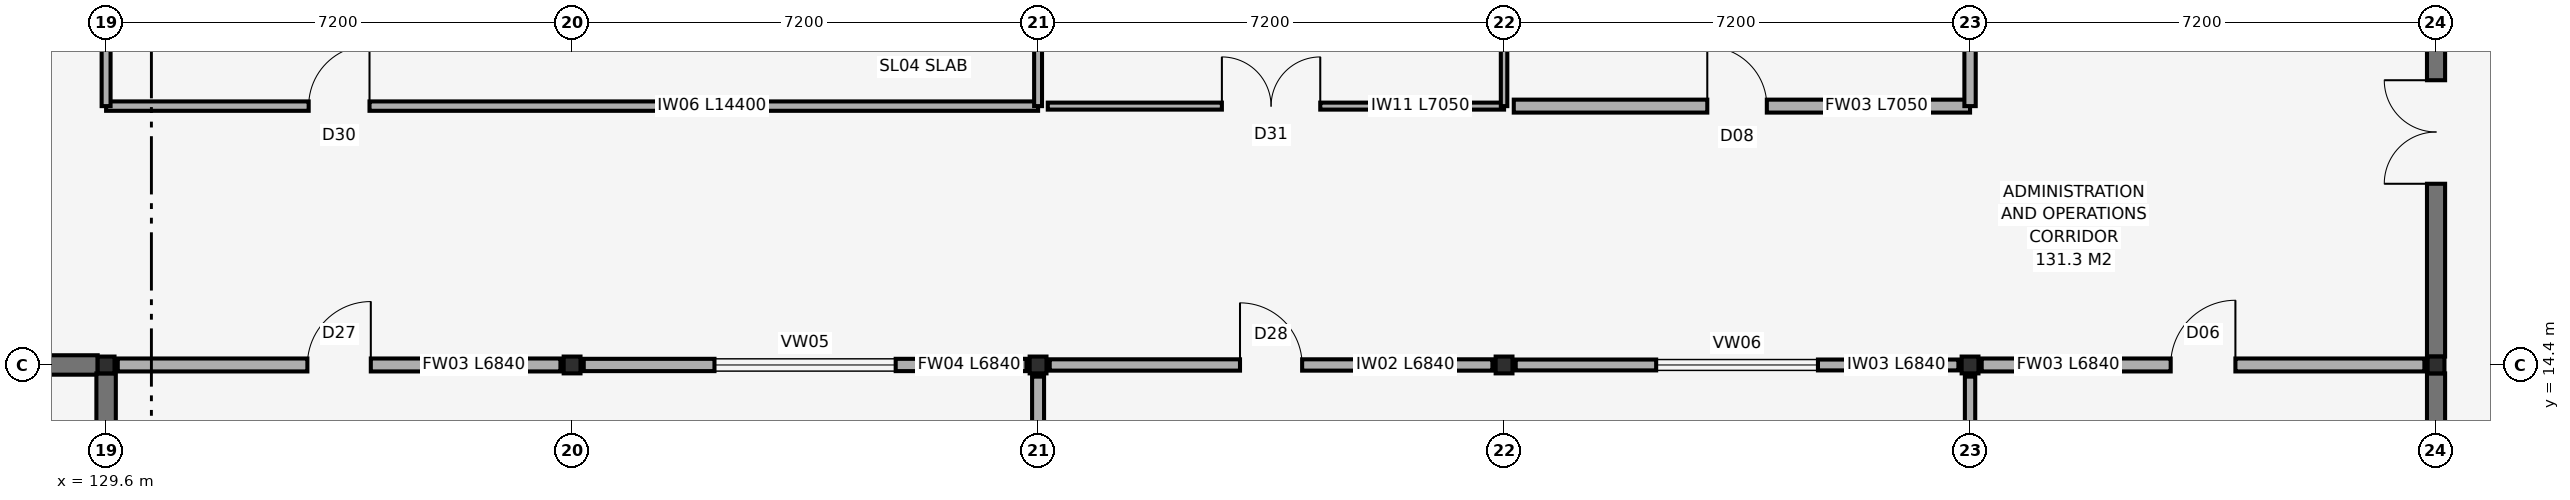
"""IFC4 building model, lengths in metres.
Left out: names, types, materials, properties, quantities, classifications, styles, units other than length and angle.
Written with IfcOpenShell. Run it as: python <this file> out.ifc"""

import sys

from ifc_helpers import new_model, si_unit, direction, frame, frame_2d, origin, origin_2d, place, context, subcontext, project, spatial, rectangle, hollow_rectangle, extrude, element, fill, save


model = new_model("IFC4")
c1 = context("Model", 3, precision=1e-05, world=origin(), true_north=direction((0.0, 1.0)))
c2 = subcontext(c1, "Body", "Model", "MODEL_VIEW")
j1 = project(units=[si_unit("LENGTHUNIT", "METRE"), si_unit("PLANEANGLEUNIT", "RADIAN")], contexts=[c1])
p1 = place(None, origin())
s1 = spatial("IfcSite", under=j1, at=p1, CompositionType="ELEMENT")
p2 = place(p1, origin())
s2 = spatial("IfcBuilding", under=s1, at=p2, CompositionType="ELEMENT")
p3 = place(p2, frame((0.0, 0.0, 23.4)))
s3 = spatial("IfcBuildingStorey", under=s2, at=p3, CompositionType="ELEMENT", Elevation=23.4)
for number, where, z_axis, x_axis in (
    (1, (129.6, 14.4, 0.0), (0.0, 0.0, 1.0), (1.0, 0.0, 0.0)),
    (2, (136.8, 14.4, 0.0), (0.0, 0.0, 1.0), (1.0, 0.0, 0.0)),
    (3, (144.0, 14.4, 0.0), (0.0, 0.0, 1.0), (1.0, 0.0, 0.0)),
    (4, (151.2, 14.4, 0.0), (0.0, 0.0, 1.0), (1.0, 0.0, 0.0)),
    (5, (158.4, 14.4, 0.0), (0.0, 0.0, 1.0), (1.0, 0.0, 0.0)),
    (6, (165.6, 14.4, 0.0), (0.0, 0.0, 1.0), (1.0, 0.0, 0.0)),
):
    element("IfcColumn", number, at=place(p3, frame(where, z_axis=z_axis, x_axis=x_axis)), inside=s3, PredefinedType="COLUMN", context=c2, shape_type="SweptSolid", body=[
        extrude(hollow_rectangle(XDim=0.26, YDim=0.26, WallThickness=0.012, at=origin_2d()), origin(), (0.0, 0.0, 1.0), 4.2),
    ])
p4 = place(p3, frame((122.53, 14.4, 0.0), z_axis=(0.0, 0.0, 1.0), x_axis=(1.0, 0.0, 0.0)))
e7 = element("IfcWall", 7, at=p4, inside=s3, PredefinedType="SHEAR", context=c2, shape_type="SweptSolid", body=[
    extrude(rectangle(XDim=6.94, YDim=0.3, at=frame_2d((3.47, 0.0))), origin(), (0.0, 0.0, 1.0), 4.0),
])
p5 = place(p3, frame((129.6, 7.33, 0.0), z_axis=(0.0, 0.0, 1.0), x_axis=(0.0, 1.0, 0.0)))
e8 = element("IfcWall", 8, at=p5, inside=s3, PredefinedType="SHEAR", context=c2, shape_type="SweptSolid", body=[
    extrude(rectangle(XDim=6.94, YDim=0.3, at=frame_2d((3.47, 0.0))), origin(), (0.0, 0.0, 1.0), 4.0),
])
p6 = place(p5, frame((2.67, 0.0, 0.0)))
e9 = element("IfcOpeningElement", 9, at=p6, cuts=e8, PredefinedType="OPENING", context=c2, shape_type="SweptSolid", body=[
    extrude(rectangle(XDim=1.6, YDim=2.2, at=frame_2d((0.8, 1.1))), frame((0.0, 0.165, 0.0), z_axis=(0.0, -1.0, 0.0), x_axis=(1.0, 0.0, 0.0)), (0.0, 0.0, 1.0), 0.33),
])
p7 = place(p3, frame((165.6, 7.33, 0.0), z_axis=(0.0, 0.0, 1.0), x_axis=(0.0, 1.0, 0.0)))
e10 = element("IfcWall", 10, at=p7, inside=s3, PredefinedType="SHEAR", context=c2, shape_type="SweptSolid", body=[
    extrude(rectangle(XDim=6.94, YDim=0.28, at=frame_2d((3.47, 0.0))), origin(), (0.0, 0.0, 1.0), 4.0),
])
p8 = place(p3, frame((165.6, 14.53, 0.0), z_axis=(0.0, 0.0, 1.0), x_axis=(0.0, 1.0, 0.0)))
e11 = element("IfcWall", 11, at=p8, inside=s3, PredefinedType="SHEAR", context=c2, shape_type="SweptSolid", body=[
    extrude(rectangle(XDim=6.94, YDim=0.28, at=frame_2d((3.47, 0.0))), origin(), (0.0, 0.0, 1.0), 4.0),
])
p9 = place(p8, frame((2.67, 0.0, 0.0)))
e12 = element("IfcOpeningElement", 12, at=p9, cuts=e11, PredefinedType="OPENING", context=c2, shape_type="SweptSolid", body=[
    extrude(rectangle(XDim=1.6, YDim=2.2, at=frame_2d((0.8, 1.1))), frame((0.0, 0.155, 0.0), z_axis=(0.0, -1.0, 0.0), x_axis=(1.0, 0.0, 0.0)), (0.0, 0.0, 1.0), 0.31),
])
p10 = place(p3, frame((129.78, 14.4, 0.0), z_axis=(0.0, 0.0, 1.0), x_axis=(1.0, 0.0, 0.0)))
e13 = element("IfcWall", 13, at=p10, inside=s3, PredefinedType="SOLIDWALL", context=c2, shape_type="SweptSolid", body=[
    extrude(rectangle(XDim=6.84, YDim=0.2, at=frame_2d((3.42, 0.0))), origin(), (0.0, 0.0, 1.0), 3.98),
])
p11 = place(p10, frame((2.93, 0.0, 0.0)))
e14 = element("IfcOpeningElement", 14, at=p11, cuts=e13, PredefinedType="OPENING", context=c2, shape_type="SweptSolid", body=[
    extrude(rectangle(XDim=0.98, YDim=2.15, at=frame_2d((0.49, 1.075))), frame((0.0, 0.115, 0.0), z_axis=(0.0, -1.0, 0.0), x_axis=(1.0, 0.0, 0.0)), (0.0, 0.0, 1.0), 0.23),
])
p12 = place(p3, frame((136.98, 14.4, 0.0), z_axis=(0.0, 0.0, 1.0), x_axis=(1.0, 0.0, 0.0)))
e15 = element("IfcWall", 15, at=p12, inside=s3, PredefinedType="SOLIDWALL", context=c2, shape_type="SweptSolid", body=[
    extrude(rectangle(XDim=6.84, YDim=0.19, at=frame_2d((3.42, 0.0))), origin(), (0.0, 0.0, 1.0), 3.98),
])
p13 = place(p12, frame((2.02, 0.0, 0.95)))
e16 = element("IfcOpeningElement", 16, at=p13, cuts=e15, PredefinedType="OPENING", context=c2, shape_type="SweptSolid", body=[
    extrude(rectangle(XDim=2.8, YDim=1.35, at=frame_2d((1.4, 0.675))), frame((0.0, 0.11, 0.0), z_axis=(0.0, -1.0, 0.0), x_axis=(1.0, 0.0, 0.0)), (0.0, 0.0, 1.0), 0.22),
])
p14 = place(p3, frame((144.0, 7.38, 0.0), z_axis=(0.0, 0.0, 1.0), x_axis=(0.0, 1.0, 0.0)))
e17 = element("IfcWall", 17, at=p14, inside=s3, PredefinedType="PARTITIONING", context=c2, shape_type="SweptSolid", body=[
    extrude(rectangle(XDim=6.84, YDim=0.185, at=frame_2d((3.42, 0.0))), origin(), (0.0, 0.0, 1.0), 3.98),
])
p15 = place(p3, frame((144.18, 14.4, 0.0), z_axis=(0.0, 0.0, 1.0), x_axis=(1.0, 0.0, 0.0)))
e18 = element("IfcWall", 18, at=p15, inside=s3, PredefinedType="PARTITIONING", context=c2, shape_type="SweptSolid", body=[
    extrude(rectangle(XDim=6.84, YDim=0.175, at=frame_2d((3.42, 0.0))), origin(), (0.0, 0.0, 1.0), 3.98),
])
p16 = place(p15, frame((2.94, 0.0, 0.0)))
e19 = element("IfcOpeningElement", 19, at=p16, cuts=e18, PredefinedType="OPENING", context=c2, shape_type="SweptSolid", body=[
    extrude(rectangle(XDim=0.96, YDim=2.15, at=frame_2d((0.48, 1.075))), frame((0.0, 0.103, 0.0), z_axis=(0.0, -1.0, 0.0), x_axis=(1.0, 0.0, 0.0)), (0.0, 0.0, 1.0), 0.205),
])
p17 = place(p3, frame((151.38, 14.4, 0.0), z_axis=(0.0, 0.0, 1.0), x_axis=(1.0, 0.0, 0.0)))
e20 = element("IfcWall", 20, at=p17, inside=s3, PredefinedType="PARTITIONING", context=c2, shape_type="SweptSolid", body=[
    extrude(rectangle(XDim=6.84, YDim=0.168, at=frame_2d((3.42, 0.0))), origin(), (0.0, 0.0, 1.0), 3.98),
])
p18 = place(p17, frame((2.17, 0.0, 0.95)))
e21 = element("IfcOpeningElement", 21, at=p18, cuts=e20, PredefinedType="OPENING", context=c2, shape_type="SweptSolid", body=[
    extrude(rectangle(XDim=2.5, YDim=1.35, at=frame_2d((1.25, 0.675))), frame((0.0, 0.099, 0.0), z_axis=(0.0, -1.0, 0.0), x_axis=(1.0, 0.0, 0.0)), (0.0, 0.0, 1.0), 0.198),
])
p19 = place(p3, frame((158.4, 7.38, 0.0), z_axis=(0.0, 0.0, 1.0), x_axis=(0.0, 1.0, 0.0)))
e22 = element("IfcWall", 22, at=p19, inside=s3, PredefinedType="PARTITIONING", context=c2, shape_type="SweptSolid", body=[
    extrude(rectangle(XDim=6.84, YDim=0.16, at=frame_2d((3.42, 0.0))), origin(), (0.0, 0.0, 1.0), 3.98),
])
p20 = place(p3, frame((158.58, 14.4, 0.0), z_axis=(0.0, 0.0, 1.0), x_axis=(1.0, 0.0, 0.0)))
e23 = element("IfcWall", 23, at=p20, inside=s3, PredefinedType="SOLIDWALL", context=c2, shape_type="SweptSolid", body=[
    extrude(rectangle(XDim=6.84, YDim=0.2, at=frame_2d((3.42, 0.0))), origin(), (0.0, 0.0, 1.0), 3.98),
])
p21 = place(p20, frame((2.92, 0.0, 0.0)))
e24 = element("IfcOpeningElement", 24, at=p21, cuts=e23, PredefinedType="OPENING", context=c2, shape_type="SweptSolid", body=[
    extrude(rectangle(XDim=1.0, YDim=2.1, at=frame_2d((0.5, 1.05))), frame((0.0, 0.115, 0.0), z_axis=(0.0, -1.0, 0.0), x_axis=(1.0, 0.0, 0.0)), (0.0, 0.0, 1.0), 0.23),
])
p22 = place(p3, frame((129.6, 18.4, 0.0), z_axis=(0.0, 0.0, 1.0), x_axis=(1.0, 0.0, 0.0)))
e25 = element("IfcWall", 25, at=p22, inside=s3, PredefinedType="PARTITIONING", context=c2, shape_type="SweptSolid", body=[
    extrude(rectangle(XDim=14.4, YDim=0.145, at=frame_2d((7.2, 0.0))), origin(), (0.0, 0.0, 1.0), 3.98),
])
p23 = place(p22, frame((3.13, 0.0, 0.0)))
e26 = element("IfcOpeningElement", 26, at=p23, cuts=e25, PredefinedType="OPENING", context=c2, shape_type="SweptSolid", body=[
    extrude(rectangle(XDim=0.94, YDim=2.15, at=frame_2d((0.47, 1.075))), frame((0.0, 0.087, 0.0), z_axis=(0.0, -1.0, 0.0), x_axis=(1.0, 0.0, 0.0)), (0.0, 0.0, 1.0), 0.175),
])
p24 = place(p3, frame((129.6, 18.4, 0.0), z_axis=(0.0, 0.0, 1.0), x_axis=(0.0, 1.0, 0.0)))
e27 = element("IfcWall", 27, at=p24, inside=s3, PredefinedType="PARTITIONING", context=c2, shape_type="SweptSolid", body=[
    extrude(rectangle(XDim=3.02, YDim=0.138, at=frame_2d((1.51, 0.0))), origin(), (0.0, 0.0, 1.0), 3.98),
])
p25 = place(p3, frame((144.0, 18.4, 0.0), z_axis=(0.0, 0.0, 1.0), x_axis=(0.0, 1.0, 0.0)))
e28 = element("IfcWall", 28, at=p25, inside=s3, PredefinedType="PARTITIONING", context=c2, shape_type="SweptSolid", body=[
    extrude(rectangle(XDim=3.02, YDim=0.122, at=frame_2d((1.51, 0.0))), origin(), (0.0, 0.0, 1.0), 3.98),
])
p26 = place(p3, frame((144.15, 18.4, 0.0), z_axis=(0.0, 0.0, 1.0), x_axis=(1.0, 0.0, 0.0)))
e29 = element("IfcWall", 29, at=p26, inside=s3, PredefinedType="PARTITIONING", context=c2, shape_type="SweptSolid", body=[
    extrude(rectangle(XDim=7.05, YDim=0.108, at=frame_2d((3.525, 0.0))), origin(), (0.0, 0.0, 1.0), 3.98),
])
p27 = place(p26, frame((2.69, 0.0, 0.0)))
e30 = element("IfcOpeningElement", 30, at=p27, cuts=e29, PredefinedType="OPENING", context=c2, shape_type="SweptSolid", body=[
    extrude(rectangle(XDim=1.52, YDim=2.2, at=frame_2d((0.76, 1.1))), frame((0.0, 0.069, 0.0), z_axis=(0.0, -1.0, 0.0), x_axis=(1.0, 0.0, 0.0)), (0.0, 0.0, 1.0), 0.138),
])
p28 = place(p3, frame((151.2, 18.4, 0.0), z_axis=(0.0, 0.0, 1.0), x_axis=(0.0, 1.0, 0.0)))
e31 = element("IfcWall", 31, at=p28, inside=s3, PredefinedType="PARTITIONING", context=c2, shape_type="SweptSolid", body=[
    extrude(rectangle(XDim=3.02, YDim=0.1, at=frame_2d((1.51, 0.0))), origin(), (0.0, 0.0, 1.0), 3.98),
])
p29 = place(p3, frame((151.35, 18.4, 0.0), z_axis=(0.0, 0.0, 1.0), x_axis=(1.0, 0.0, 0.0)))
e32 = element("IfcWall", 32, at=p29, inside=s3, PredefinedType="SOLIDWALL", context=c2, shape_type="SweptSolid", body=[
    extrude(rectangle(XDim=7.05, YDim=0.2, at=frame_2d((3.525, 0.0))), origin(), (0.0, 0.0, 1.0), 3.98),
])
p30 = place(p29, frame((2.99, 0.0, 0.0)))
e33 = element("IfcOpeningElement", 33, at=p30, cuts=e32, PredefinedType="OPENING", context=c2, shape_type="SweptSolid", body=[
    extrude(rectangle(XDim=0.92, YDim=2.1, at=frame_2d((0.46, 1.05))), frame((0.0, 0.115, 0.0), z_axis=(0.0, -1.0, 0.0), x_axis=(1.0, 0.0, 0.0)), (0.0, 0.0, 1.0), 0.23),
])
p31 = place(p3, frame((158.4, 18.4, 0.0), z_axis=(0.0, 0.0, 1.0), x_axis=(0.0, 1.0, 0.0)))
e34 = element("IfcWall", 34, at=p31, inside=s3, PredefinedType="PARTITIONING", context=c2, shape_type="SweptSolid", body=[
    extrude(rectangle(XDim=3.02, YDim=0.175, at=frame_2d((1.51, 0.0))), origin(), (0.0, 0.0, 1.0), 3.98),
])
p32 = place(p9, origin())
e35 = element("IfcDoor", 35, at=p32, inside=s3, OperationType="DOUBLE_SWING_LEFT", PredefinedType="DOOR", context=c2, shape_type="SweptSolid", body=[
    extrude(rectangle(XDim=1.6, YDim=2.2, at=frame_2d((0.8, 1.1))), frame((0.0, 0.025, 0.0), z_axis=(0.0, -1.0, 0.0), x_axis=(1.0, 0.0, 0.0)), (0.0, 0.0, 1.0), 0.05),
])
fill(e12, e35)
p33 = place(p11, frame((0.98, 0.0, 0.0), z_axis=(0.0, 0.0, 1.0), x_axis=(-1.0, 0.0, 0.0)))
e36 = element("IfcDoor", 36, at=p33, inside=s3, OperationType="SINGLE_SWING_LEFT", PredefinedType="DOOR", context=c2, shape_type="SweptSolid", body=[
    extrude(rectangle(XDim=0.98, YDim=2.15, at=frame_2d((0.49, 1.075))), frame((0.0, 0.025, 0.0), z_axis=(0.0, -1.0, 0.0), x_axis=(1.0, 0.0, 0.0)), (0.0, 0.0, 1.0), 0.05),
])
fill(e14, e36)
p34 = place(p13, origin())
e37 = element("IfcWindow", 37, at=p34, inside=s3, PartitioningType="SINGLE_PANEL", PredefinedType="WINDOW", context=c2, shape_type="SweptSolid", body=[
    extrude(rectangle(XDim=2.8, YDim=1.35, at=frame_2d((1.4, 0.675))), frame((0.0, 0.03, 0.0), z_axis=(0.0, -1.0, 0.0), x_axis=(1.0, 0.0, 0.0)), (0.0, 0.0, 1.0), 0.06),
])
fill(e16, e37)
p35 = place(p16, frame((0.96, 0.0, 0.0), z_axis=(0.0, 0.0, 1.0), x_axis=(-1.0, 0.0, 0.0)))
e38 = element("IfcDoor", 38, at=p35, inside=s3, OperationType="SINGLE_SWING_RIGHT", PredefinedType="DOOR", context=c2, shape_type="SweptSolid", body=[
    extrude(rectangle(XDim=0.96, YDim=2.15, at=frame_2d((0.48, 1.075))), frame((0.0, 0.025, 0.0), z_axis=(0.0, -1.0, 0.0), x_axis=(1.0, 0.0, 0.0)), (0.0, 0.0, 1.0), 0.05),
])
fill(e19, e38)
p36 = place(p18, origin())
e39 = element("IfcWindow", 39, at=p36, inside=s3, PartitioningType="SINGLE_PANEL", PredefinedType="WINDOW", context=c2, shape_type="SweptSolid", body=[
    extrude(rectangle(XDim=2.5, YDim=1.35, at=frame_2d((1.25, 0.675))), frame((0.0, 0.03, 0.0), z_axis=(0.0, -1.0, 0.0), x_axis=(1.0, 0.0, 0.0)), (0.0, 0.0, 1.0), 0.06),
])
fill(e21, e39)
p37 = place(p21, frame((1.0, 0.0, 0.0), z_axis=(0.0, 0.0, 1.0), x_axis=(-1.0, 0.0, 0.0)))
e40 = element("IfcDoor", 40, at=p37, inside=s3, OperationType="SINGLE_SWING_LEFT", PredefinedType="DOOR", context=c2, shape_type="SweptSolid", body=[
    extrude(rectangle(XDim=1.0, YDim=2.1, at=frame_2d((0.5, 1.05))), frame((0.0, 0.025, 0.0), z_axis=(0.0, -1.0, 0.0), x_axis=(1.0, 0.0, 0.0)), (0.0, 0.0, 1.0), 0.05),
])
fill(e24, e40)
p38 = place(p23, origin())
e41 = element("IfcDoor", 41, at=p38, inside=s3, OperationType="SINGLE_SWING_RIGHT", PredefinedType="DOOR", context=c2, shape_type="SweptSolid", body=[
    extrude(rectangle(XDim=0.94, YDim=2.15, at=frame_2d((0.47, 1.075))), frame((0.0, 0.025, 0.0), z_axis=(0.0, -1.0, 0.0), x_axis=(1.0, 0.0, 0.0)), (0.0, 0.0, 1.0), 0.05),
])
fill(e26, e41)
p39 = place(p27, origin())
e42 = element("IfcDoor", 42, at=p39, inside=s3, OperationType="DOUBLE_SWING_LEFT", PredefinedType="DOOR", context=c2, shape_type="SweptSolid", body=[
    extrude(rectangle(XDim=1.52, YDim=2.2, at=frame_2d((0.76, 1.1))), frame((0.0, 0.025, 0.0), z_axis=(0.0, -1.0, 0.0), x_axis=(1.0, 0.0, 0.0)), (0.0, 0.0, 1.0), 0.05),
])
fill(e30, e42)
p40 = place(p30, origin())
e43 = element("IfcDoor", 43, at=p40, inside=s3, OperationType="SINGLE_SWING_LEFT", PredefinedType="DOOR", context=c2, shape_type="SweptSolid", body=[
    extrude(rectangle(XDim=0.92, YDim=2.1, at=frame_2d((0.46, 1.05))), frame((0.0, 0.025, 0.0), z_axis=(0.0, -1.0, 0.0), x_axis=(1.0, 0.0, 0.0)), (0.0, 0.0, 1.0), 0.05),
])
fill(e33, e43)
save(model, sys.argv[1])
